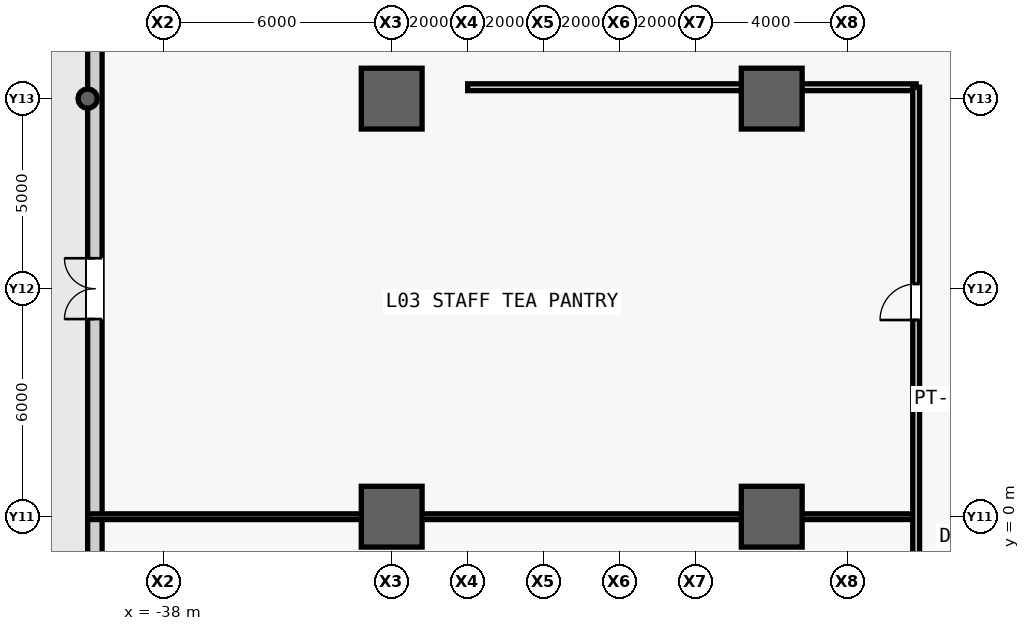
"""IFC4 building model, lengths in metres.
Left out: names, types, materials, properties, quantities, classifications, styles, units other than length and angle.
Written with IfcOpenShell. Run it as: python <this file> out.ifc"""

import sys

from ifc_helpers import new_model, si_unit, direction, frame, frame_2d, origin, origin_2d, place, context, subcontext, project, spatial, rectangle, hollow_circle, extrude, source, transform, mapped, element, fill, save


model = new_model("IFC4")
c1 = context("Model", 3, precision=1e-05, world=origin(), true_north=direction((0.0, 1.0)))
c2 = subcontext(c1, "Body", "Model", "MODEL_VIEW")
j1 = project(units=[si_unit("LENGTHUNIT", "METRE"), si_unit("PLANEANGLEUNIT", "RADIAN")], contexts=[c1])
p1 = place(None, origin())
s1 = spatial("IfcSite", under=j1, at=p1, CompositionType="ELEMENT")
p2 = place(p1, origin())
s2 = spatial("IfcBuilding", under=s1, at=p2, CompositionType="ELEMENT")
p3 = place(p2, frame((0.0, 0.0, 17.4)))
s3 = spatial("IfcBuildingStorey", under=s2, at=p3, CompositionType="ELEMENT", Elevation=17.4)
m1 = source(origin(), c2, "Body", "SweptSolid", [
    extrude(hollow_circle(Radius=0.254, WallThickness=0.025, at=origin_2d()), origin(), (0.0, 0.0, 1.0), 4.8),
])
p4 = place(p3, frame((-40.0, 11.0, 0.0), z_axis=(0.0, 0.0, 1.0), x_axis=(1.0, 0.0, 0.0)))
e1 = element("IfcColumn", 1, at=p4, inside=s3, PredefinedType="COLUMN", context=c2, shape_type="MappedRepresentation", body=[
    mapped(m1, transform((0.0, 0.0, 0.0), scale=1.0)),
])
m2 = source(origin(), c2, "Body", "SweptSolid", [
    extrude(rectangle(XDim=1.6, YDim=1.6, at=origin_2d()), origin(), (0.0, 0.0, 1.0), 4.8),
])
for number, where, z_axis, x_axis in (
    (2, (-32.0, 0.0, 0.0), (0.0, 0.0, 1.0), (1.0, 0.0, 0.0)),
    (3, (-32.0, 11.0, 0.0), (0.0, 0.0, 1.0), (1.0, 0.0, 0.0)),
    (4, (-22.0, 0.0, 0.0), (0.0, 0.0, 1.0), (1.0, 0.0, 0.0)),
    (5, (-22.0, 11.0, 0.0), (0.0, 0.0, 1.0), (1.0, 0.0, 0.0)),
):
    element("IfcColumn", number, at=place(p3, frame(where, z_axis=z_axis, x_axis=x_axis)), inside=s3, PredefinedType="COLUMN", context=c2, shape_type="MappedRepresentation", body=[
        mapped(m2, transform((0.0, 0.0, 0.0), scale=1.0)),
    ])
m3 = source(origin(), c2, "Body", "SweptSolid", [
    extrude(rectangle(XDim=69.24, YDim=0.38, at=frame_2d((34.62, 0.0))), origin(), (0.0, 0.0, 1.0), 2.68),
])
p5 = place(p3, frame((-39.81, -34.62, 0.0), z_axis=(0.0, 0.0, 1.0), x_axis=(0.0, 1.0, 0.0)))
e6 = element("IfcWall", 6, at=p5, inside=s3, PredefinedType="STANDARD", context=c2, shape_type="MappedRepresentation", body=[
    mapped(m3, transform((0.0, 0.0, 0.0), scale=1.0)),
])
m4 = source(origin(), c2, "Body", "SweptSolid", [
    extrude(rectangle(XDim=1.6, YDim=2.25, at=frame_2d((0.8, 1.125))), frame((0.0, 0.2, 0.0), z_axis=(0.0, -1.0, 0.0), x_axis=(1.0, 0.0, 0.0)), (0.0, 0.0, 1.0), 0.4),
])
p6 = place(p5, frame((39.82, 0.0, 0.0)))
e7 = element("IfcOpeningElement", 7, at=p6, cuts=e6, PredefinedType="OPENING", context=c2, shape_type="MappedRepresentation", body=[
    mapped(m4, transform((0.0, 0.0, 0.0), scale=1.0)),
])
m5 = source(origin(), c2, "Body", "SweptSolid", [
    extrude(rectangle(XDim=1.6, YDim=1.96, at=frame_2d((0.8, 0.98))), frame((0.0, 0.2, 0.0), z_axis=(0.0, -1.0, 0.0), x_axis=(1.0, 0.0, 0.0)), (0.0, 0.0, 1.0), 0.4),
])
p7 = place(p5, frame((16.51, 0.0, 0.5)))
e8 = element("IfcOpeningElement", 8, at=p7, cuts=e6, PredefinedType="OPENING", context=c2, shape_type="MappedRepresentation", body=[
    mapped(m5, transform((0.0, 0.0, 0.0), scale=1.0)),
])
p8 = place(p5, frame((51.13, 0.0, 0.5)))
e9 = element("IfcOpeningElement", 9, at=p8, cuts=e6, PredefinedType="OPENING", context=c2, shape_type="MappedRepresentation", body=[
    mapped(m5, transform((0.0, 0.0, 0.0), scale=1.0)),
])
m6 = source(origin(), c2, "Body", "SweptSolid", [
    extrude(rectangle(XDim=11.8, YDim=0.18, at=frame_2d((5.9, 0.0))), origin(), (0.0, 0.0, 1.0), 2.68),
])
p9 = place(p3, frame((-30.0, 11.3, 0.0), z_axis=(0.0, 0.0, 1.0), x_axis=(1.0, 0.0, 0.0)))
e10 = element("IfcWall", 10, at=p9, inside=s3, PredefinedType="PARTITIONING", context=c2, shape_type="MappedRepresentation", body=[
    mapped(m6, transform((0.0, 0.0, 0.0), scale=1.0)),
])
m7 = source(origin(), c2, "Body", "SweptSolid", [
    extrude(rectangle(XDim=21.8, YDim=0.15, at=frame_2d((10.9, 0.0))), origin(), (0.0, 0.0, 1.0), 2.68),
])
p10 = place(p3, frame((-40.0, 0.0, 0.0), z_axis=(0.0, 0.0, 1.0), x_axis=(1.0, 0.0, 0.0)))
e11 = element("IfcWall", 11, at=p10, inside=s3, PredefinedType="PARTITIONING", context=c2, shape_type="MappedRepresentation", body=[
    mapped(m7, transform((0.0, 0.0, 0.0), scale=1.0)),
])
m8 = source(origin(), c2, "Body", "SweptSolid", [
    extrude(rectangle(XDim=24.3, YDim=0.18, at=frame_2d((12.15, 0.0))), origin(), (0.0, 0.0, 1.0), 4.48),
])
p11 = place(p3, frame((-18.2, -13.0, 0.0), z_axis=(0.0, 0.0, 1.0), x_axis=(0.0, 1.0, 0.0)))
e12 = element("IfcWall", 12, at=p11, inside=s3, PredefinedType="PARTITIONING", context=c2, shape_type="MappedRepresentation", body=[
    mapped(m8, transform((0.0, 0.0, 0.0), scale=1.0)),
])
m9 = source(origin(), c2, "Body", "SweptSolid", [
    extrude(rectangle(XDim=0.95, YDim=2.15, at=frame_2d((0.475, 1.075))), frame((0.0, 0.1, 0.0), z_axis=(0.0, -1.0, 0.0), x_axis=(1.0, 0.0, 0.0)), (0.0, 0.0, 1.0), 0.2),
])
p12 = place(p11, frame((6.025, 0.0, 0.0)))
e13 = element("IfcOpeningElement", 13, at=p12, cuts=e12, PredefinedType="OPENING", context=c2, shape_type="MappedRepresentation", body=[
    mapped(m9, transform((0.0, 0.0, 0.0), scale=1.0)),
])
p13 = place(p11, frame((18.175, 0.0, 0.0)))
e14 = element("IfcOpeningElement", 14, at=p13, cuts=e12, PredefinedType="OPENING", context=c2, shape_type="MappedRepresentation", body=[
    mapped(m9, transform((0.0, 0.0, 0.0), scale=1.0)),
])
m10 = source(origin(), c2, "Body", "SweptSolid", [
    extrude(rectangle(XDim=1.6, YDim=2.25, at=frame_2d((0.8, 1.125))), frame((0.0, 0.025, 0.0), z_axis=(0.0, -1.0, 0.0), x_axis=(1.0, 0.0, 0.0)), (0.0, 0.0, 1.0), 0.05),
])
p14 = place(p6, origin())
e15 = element("IfcDoor", 15, at=p14, inside=s3, OperationType="DOUBLE_DOOR_SINGLE_SWING", PredefinedType="DOOR", context=c2, shape_type="MappedRepresentation", body=[
    mapped(m10, transform((0.0, 0.0, 0.0), scale=1.0)),
])
fill(e7, e15)
m11 = source(origin(), c2, "Body", "SweptSolid", [
    extrude(rectangle(XDim=0.95, YDim=2.15, at=frame_2d((0.475, 1.075))), frame((0.0, 0.025, 0.0), z_axis=(0.0, -1.0, 0.0), x_axis=(1.0, 0.0, 0.0)), (0.0, 0.0, 1.0), 0.05),
])
p15 = place(p13, origin())
e16 = element("IfcDoor", 16, at=p15, inside=s3, OperationType="SINGLE_SWING_LEFT", PredefinedType="DOOR", context=c2, shape_type="MappedRepresentation", body=[
    mapped(m11, transform((0.0, 0.0, 0.0), scale=1.0)),
])
fill(e14, e16)
save(model, sys.argv[1])
